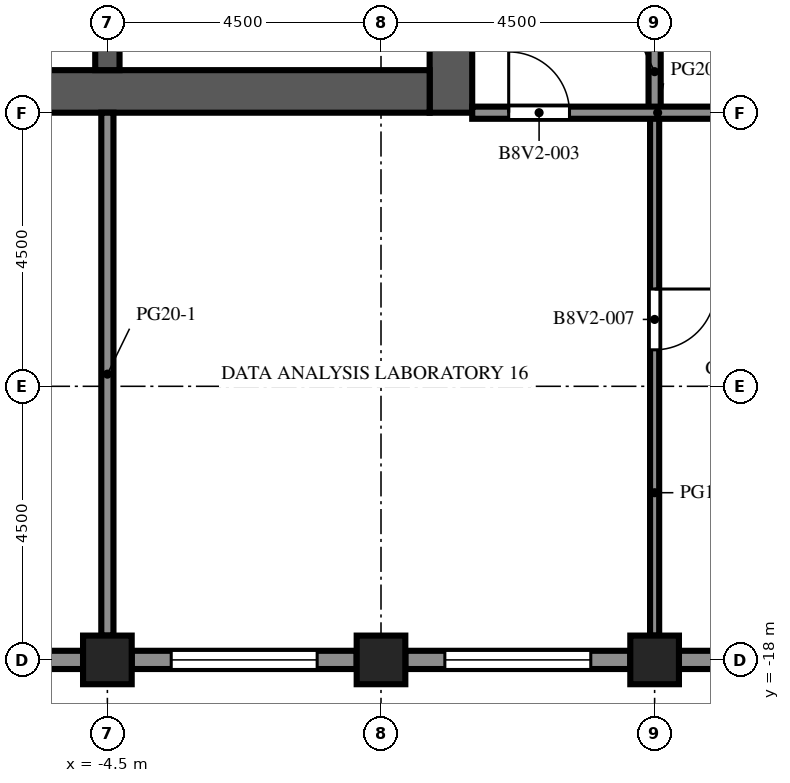
"""IFC4 building model, lengths in metres.
Left out: names, types, materials, properties, quantities, classifications, styles, units other than length and angle.
Written with IfcOpenShell. Run it as: python <this file> out.ifc"""

import sys

from ifc_helpers import new_model, si_unit, direction, frame, frame_2d, origin, origin_2d, place, context, subcontext, project, spatial, rectangle, extrude, element, fill, save


model = new_model("IFC4")
c1 = context("Model", 3, precision=1e-05, world=origin(), true_north=direction((0.0, 1.0)))
c2 = subcontext(c1, "Body", "Model", "MODEL_VIEW")
j1 = project(units=[si_unit("LENGTHUNIT", "METRE"), si_unit("PLANEANGLEUNIT", "RADIAN")], contexts=[c1])
p1 = place(None, origin())
s1 = spatial("IfcSite", under=j1, at=p1, CompositionType="ELEMENT")
p2 = place(p1, origin())
s2 = spatial("IfcBuilding", under=s1, at=p2, CompositionType="ELEMENT")
p3 = place(p2, frame((0.0, 0.0, 286.8)))
s3 = spatial("IfcBuildingStorey", under=s2, at=p3, CompositionType="ELEMENT", Elevation=286.8)
for number, where, z_axis, x_axis in (
    (1, (-4.5, -18.0, 0.0), (0.0, 0.0, 1.0), (1.0, 0.0, 0.0)),
    (2, (0.0, -18.0, 0.0), (0.0, 0.0, 1.0), (1.0, 0.0, 0.0)),
    (3, (4.5, -18.0, 0.0), (0.0, 0.0, 1.0), (1.0, 0.0, 0.0)),
):
    element("IfcColumn", number, at=place(p3, frame(where, z_axis=z_axis, x_axis=x_axis)), inside=s3, PredefinedType="COLUMN", context=c2, shape_type="SweptSolid", body=[
        extrude(rectangle(XDim=0.8, YDim=0.8, at=origin_2d()), origin(), (0.0, 0.0, 1.0), 4.1),
    ])
p4 = place(p3, frame((1.15, -9.0, 0.0), z_axis=(0.0, 0.0, 1.0), x_axis=(0.0, 1.0, 0.0)))
e4 = element("IfcWall", 4, at=p4, inside=s3, PredefinedType="SHEAR", context=c2, shape_type="SweptSolid", body=[
    extrude(rectangle(XDim=27.5, YDim=0.7, at=frame_2d((13.75, 0.0))), origin(), (0.0, 0.0, 1.0), 4.1),
])
p5 = place(p4, frame((12.55, 0.0, 0.0)))
e5 = element("IfcOpeningElement", 5, at=p5, cuts=e4, PredefinedType="OPENING", context=c2, shape_type="SweptSolid", body=[
    extrude(rectangle(XDim=2.4, YDim=2.4, at=frame_2d((1.2, 1.2))), frame((0.0, 0.36, 0.0), z_axis=(0.0, -1.0, 0.0), x_axis=(1.0, 0.0, 0.0)), (0.0, 0.0, 1.0), 0.72),
])
p6 = place(p4, frame((3.9, 0.0, 0.0)))
e6 = element("IfcOpeningElement", 6, at=p6, cuts=e4, PredefinedType="OPENING", context=c2, shape_type="SweptSolid", body=[
    extrude(rectangle(XDim=1.2, YDim=2.1, at=frame_2d((0.6, 1.05))), frame((0.0, 0.36, 0.0), z_axis=(0.0, -1.0, 0.0), x_axis=(1.0, 0.0, 0.0)), (0.0, 0.0, 1.0), 0.72),
])
p7 = place(p4, frame((22.4, 0.0, 0.0)))
e7 = element("IfcOpeningElement", 7, at=p7, cuts=e4, PredefinedType="OPENING", context=c2, shape_type="SweptSolid", body=[
    extrude(rectangle(XDim=1.2, YDim=2.1, at=frame_2d((0.6, 1.05))), frame((0.0, 0.36, 0.0), z_axis=(0.0, -1.0, 0.0), x_axis=(1.0, 0.0, 0.0)), (0.0, 0.0, 1.0), 0.72),
])
p8 = place(p3, frame((-9.8, -8.65, 0.0), z_axis=(0.0, 0.0, 1.0), x_axis=(1.0, 0.0, 0.0)))
e8 = element("IfcWall", 8, at=p8, inside=s3, PredefinedType="SHEAR", context=c2, shape_type="SweptSolid", body=[
    extrude(rectangle(XDim=10.6, YDim=0.7, at=frame_2d((5.3, 0.0))), origin(), (0.0, 0.0, 1.0), 4.1),
])
p9 = place(p3, frame((-4.5, -8.3, 0.0), z_axis=(0.0, 0.0, 1.0), x_axis=(0.0, 1.0, 0.0)))
e9 = element("IfcWall", 9, at=p9, inside=s3, PredefinedType="SHEAR", context=c2, shape_type="SweptSolid", body=[
    extrude(rectangle(XDim=7.6, YDim=0.4, at=frame_2d((3.8, 0.0))), origin(), (0.0, 0.0, 1.0), 4.1),
])
p10 = place(p3, frame((-4.9, -18.0, 0.0), z_axis=(0.0, 0.0, 1.0), x_axis=(-1.0, 0.0, 0.0)))
e10 = element("IfcWall", 10, at=p10, inside=s3, PredefinedType="SOLIDWALL", context=c2, shape_type="SweptSolid", body=[
    extrude(rectangle(XDim=3.7, YDim=0.3, at=frame_2d((1.85, 0.0))), origin(), (0.0, 0.0, 1.0), 2.85),
])
p11 = place(p10, frame((0.65, 0.0, 0.8)))
e11 = element("IfcOpeningElement", 11, at=p11, cuts=e10, PredefinedType="OPENING", context=c2, shape_type="SweptSolid", body=[
    extrude(rectangle(XDim=2.4, YDim=1.7, at=frame_2d((1.2, 0.85))), frame((0.0, 0.16, 0.0), z_axis=(0.0, -1.0, 0.0), x_axis=(1.0, 0.0, 0.0)), (0.0, 0.0, 1.0), 0.32),
])
p12 = place(p3, frame((-0.4, -18.0, 0.0), z_axis=(0.0, 0.0, 1.0), x_axis=(-1.0, 0.0, 0.0)))
e12 = element("IfcWall", 12, at=p12, inside=s3, PredefinedType="SOLIDWALL", context=c2, shape_type="SweptSolid", body=[
    extrude(rectangle(XDim=3.7, YDim=0.3, at=frame_2d((1.85, 0.0))), origin(), (0.0, 0.0, 1.0), 2.85),
])
p13 = place(p12, frame((0.65, 0.0, 0.8)))
e13 = element("IfcOpeningElement", 13, at=p13, cuts=e12, PredefinedType="OPENING", context=c2, shape_type="SweptSolid", body=[
    extrude(rectangle(XDim=2.4, YDim=1.7, at=frame_2d((1.2, 0.85))), frame((0.0, 0.16, 0.0), z_axis=(0.0, -1.0, 0.0), x_axis=(1.0, 0.0, 0.0)), (0.0, 0.0, 1.0), 0.32),
])
p14 = place(p3, frame((4.1, -18.0, 0.0), z_axis=(0.0, 0.0, 1.0), x_axis=(-1.0, 0.0, 0.0)))
e14 = element("IfcWall", 14, at=p14, inside=s3, PredefinedType="SOLIDWALL", context=c2, shape_type="SweptSolid", body=[
    extrude(rectangle(XDim=3.7, YDim=0.3, at=frame_2d((1.85, 0.0))), origin(), (0.0, 0.0, 1.0), 2.85),
])
p15 = place(p14, frame((0.65, 0.0, 0.8)))
e15 = element("IfcOpeningElement", 15, at=p15, cuts=e14, PredefinedType="OPENING", context=c2, shape_type="SweptSolid", body=[
    extrude(rectangle(XDim=2.4, YDim=1.7, at=frame_2d((1.2, 0.85))), frame((0.0, 0.16, 0.0), z_axis=(0.0, -1.0, 0.0), x_axis=(1.0, 0.0, 0.0)), (0.0, 0.0, 1.0), 0.32),
])
p16 = place(p3, frame((8.6, -18.0, 0.0), z_axis=(0.0, 0.0, 1.0), x_axis=(-1.0, 0.0, 0.0)))
e16 = element("IfcWall", 16, at=p16, inside=s3, PredefinedType="SOLIDWALL", context=c2, shape_type="SweptSolid", body=[
    extrude(rectangle(XDim=3.7, YDim=0.3, at=frame_2d((1.85, 0.0))), origin(), (0.0, 0.0, 1.0), 2.85),
])
p17 = place(p16, frame((0.65, 0.0, 0.8)))
e17 = element("IfcOpeningElement", 17, at=p17, cuts=e16, PredefinedType="OPENING", context=c2, shape_type="SweptSolid", body=[
    extrude(rectangle(XDim=2.4, YDim=1.7, at=frame_2d((1.2, 0.85))), frame((0.0, 0.16, 0.0), z_axis=(0.0, -1.0, 0.0), x_axis=(1.0, 0.0, 0.0)), (0.0, 0.0, 1.0), 0.32),
])
p18 = place(p3, frame((-0.7, -8.3, 0.0), z_axis=(0.0, 0.0, 1.0), x_axis=(0.0, 1.0, 0.0)))
e18 = element("IfcWall", 18, at=p18, inside=s3, PredefinedType="PARTITIONING", context=c2, shape_type="SweptSolid", body=[
    extrude(rectangle(XDim=2.28, YDim=0.1, at=frame_2d((1.14, 0.0))), origin(), (0.0, 0.0, 1.0), 3.65),
])
p19 = place(p18, frame((0.64, 0.0, 0.0)))
e19 = element("IfcOpeningElement", 19, at=p19, cuts=e18, PredefinedType="OPENING", context=c2, shape_type="SweptSolid", body=[
    extrude(rectangle(XDim=1.0, YDim=2.1, at=frame_2d((0.5, 1.05))), frame((0.0, 0.06, 0.0), z_axis=(0.0, -1.0, 0.0), x_axis=(1.0, 0.0, 0.0)), (0.0, 0.0, 1.0), 0.12),
])
p20 = place(p3, frame((-4.5, -17.6, 0.0), z_axis=(0.0, 0.0, 1.0), x_axis=(0.0, 1.0, 0.0)))
e20 = element("IfcWall", 20, at=p20, inside=s3, PredefinedType="PARTITIONING", context=c2, shape_type="SweptSolid", body=[
    extrude(rectangle(XDim=8.6, YDim=0.2, at=frame_2d((4.3, 0.0))), origin(), (0.0, 0.0, 1.0), 3.65),
])
p21 = place(p3, frame((4.5, -9.0, 0.0), z_axis=(0.0, 0.0, 1.0), x_axis=(0.0, -1.0, 0.0)))
e21 = element("IfcWall", 21, at=p21, inside=s3, PredefinedType="PARTITIONING", context=c2, shape_type="SweptSolid", body=[
    extrude(rectangle(XDim=8.6, YDim=0.15, at=frame_2d((4.3, 0.0))), origin(), (0.0, 0.0, 1.0), 3.65),
])
p22 = place(p21, frame((2.9, 0.0, 0.0)))
e22 = element("IfcOpeningElement", 22, at=p22, cuts=e21, PredefinedType="OPENING", context=c2, shape_type="SweptSolid", body=[
    extrude(rectangle(XDim=1.0, YDim=2.1, at=frame_2d((0.5, 1.05))), frame((0.0, 0.085, 0.0), z_axis=(0.0, -1.0, 0.0), x_axis=(1.0, 0.0, 0.0)), (0.0, 0.0, 1.0), 0.17),
])
p23 = place(p3, frame((4.5, -6.0, 0.0), z_axis=(0.0, 0.0, 1.0), x_axis=(0.0, -1.0, 0.0)))
e23 = element("IfcWall", 23, at=p23, inside=s3, PredefinedType="PARTITIONING", context=c2, shape_type="SweptSolid", body=[
    extrude(rectangle(XDim=3.0, YDim=0.2, at=frame_2d((1.5, 0.0))), origin(), (0.0, 0.0, 1.0), 3.65),
])
p24 = place(p23, frame((0.65, 0.0, 0.0)))
e24 = element("IfcOpeningElement", 24, at=p24, cuts=e23, PredefinedType="OPENING", context=c2, shape_type="SweptSolid", body=[
    extrude(rectangle(XDim=1.0, YDim=2.1, at=frame_2d((0.5, 1.05))), frame((0.0, 0.11, 0.0), z_axis=(0.0, -1.0, 0.0), x_axis=(1.0, 0.0, 0.0)), (0.0, 0.0, 1.0), 0.22),
])
p25 = place(p3, frame((6.0, -9.0, 0.0), z_axis=(0.0, 0.0, 1.0), x_axis=(-1.0, 0.0, 0.0)))
e25 = element("IfcWall", 25, at=p25, inside=s3, PredefinedType="PARTITIONING", context=c2, shape_type="SweptSolid", body=[
    extrude(rectangle(XDim=4.5, YDim=0.2, at=frame_2d((2.25, 0.0))), origin(), (0.0, 0.0, 1.0), 3.65),
])
p26 = place(p25, frame((2.9, 0.0, 0.0)))
e26 = element("IfcOpeningElement", 26, at=p26, cuts=e25, PredefinedType="OPENING", context=c2, shape_type="SweptSolid", body=[
    extrude(rectangle(XDim=1.0, YDim=2.1, at=frame_2d((0.5, 1.05))), frame((0.0, 0.11, 0.0), z_axis=(0.0, -1.0, 0.0), x_axis=(1.0, 0.0, 0.0)), (0.0, 0.0, 1.0), 0.22),
])
p27 = place(p13, origin())
e27 = element("IfcWindow", 27, at=p27, inside=s3, PartitioningType="SINGLE_PANEL", PredefinedType="WINDOW", context=c2, shape_type="SweptSolid", body=[
    extrude(rectangle(XDim=2.4, YDim=1.7, at=frame_2d((1.2, 0.85))), frame((0.0, 0.03, 0.0), z_axis=(0.0, -1.0, 0.0), x_axis=(1.0, 0.0, 0.0)), (0.0, 0.0, 1.0), 0.06),
])
fill(e13, e27)
p28 = place(p15, origin())
e28 = element("IfcWindow", 28, at=p28, inside=s3, PartitioningType="SINGLE_PANEL", PredefinedType="WINDOW", context=c2, shape_type="SweptSolid", body=[
    extrude(rectangle(XDim=2.4, YDim=1.7, at=frame_2d((1.2, 0.85))), frame((0.0, 0.03, 0.0), z_axis=(0.0, -1.0, 0.0), x_axis=(1.0, 0.0, 0.0)), (0.0, 0.0, 1.0), 0.06),
])
fill(e15, e28)
p29 = place(p26, origin())
e29 = element("IfcDoor", 29, at=p29, inside=s3, OperationType="SINGLE_SWING_RIGHT", PredefinedType="DOOR", context=c2, shape_type="SweptSolid", body=[
    extrude(rectangle(XDim=1.0, YDim=2.1, at=frame_2d((0.5, 1.05))), frame((0.0, 0.025, 0.0), z_axis=(0.0, -1.0, 0.0), x_axis=(1.0, 0.0, 0.0)), (0.0, 0.0, 1.0), 0.05),
])
fill(e26, e29)
p30 = place(p22, origin())
e30 = element("IfcDoor", 30, at=p30, inside=s3, OperationType="SINGLE_SWING_LEFT", PredefinedType="DOOR", context=c2, shape_type="SweptSolid", body=[
    extrude(rectangle(XDim=1.0, YDim=2.1, at=frame_2d((0.5, 1.05))), frame((0.0, 0.025, 0.0), z_axis=(0.0, -1.0, 0.0), x_axis=(1.0, 0.0, 0.0)), (0.0, 0.0, 1.0), 0.05),
])
fill(e22, e30)
save(model, sys.argv[1])
